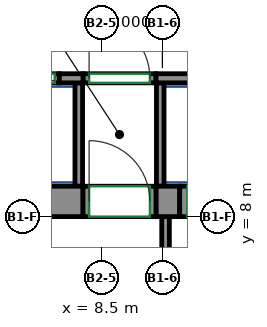
"""IFC4 building model, lengths in metres.
Left out: names, types, materials, properties, quantities, classifications, styles, units other than length and angle.
Written with IfcOpenShell. Run it as: python <this file> out.ifc"""

import sys

from ifc_helpers import new_model, si_unit, direction, frame, frame_2d, origin, place, context, subcontext, project, spatial, rectangle, extrude, source, transform, mapped, element, fill, save


model = new_model("IFC4")
c1 = context("Model", 3, precision=1e-05, world=origin(), true_north=direction((0.0, 1.0)))
c2 = subcontext(c1, "Body", "Model", "MODEL_VIEW")
j1 = project(units=[si_unit("LENGTHUNIT", "METRE"), si_unit("PLANEANGLEUNIT", "RADIAN")], contexts=[c1])
p1 = place(None, origin())
s1 = spatial("IfcSite", under=j1, at=p1, CompositionType="ELEMENT")
p2 = place(p1, origin())
s2 = spatial("IfcBuilding", under=s1, at=p2, CompositionType="ELEMENT")
p3 = place(p2, frame((0.0, 0.0, 27.0)))
s3 = spatial("IfcBuildingStorey", under=s2, at=p3, CompositionType="ELEMENT", Elevation=27.0)
m1 = source(origin(), c2, "Body", "SweptSolid", [
    extrude(rectangle(XDim=14.18, YDim=1.0, at=frame_2d((7.09, 0.0))), origin(), (0.0, 0.0, 1.0), 3.72),
])
p4 = place(p3, frame((-6.29, 8.5, 0.0), z_axis=(0.0, 0.0, 1.0), x_axis=(1.0, 0.0, 0.0)))
e1 = element("IfcWall", 1, at=p4, inside=s3, PredefinedType="SHEAR", context=c2, shape_type="MappedRepresentation", body=[
    mapped(m1, transform((0.0, 0.0, 0.0))),
])
m2 = source(origin(), c2, "Body", "SweptSolid", [
    extrude(rectangle(XDim=0.78, YDim=1.0, at=frame_2d((0.39, 0.0))), origin(), (0.0, 0.0, 1.0), 3.72),
])
p5 = place(p3, frame((10.29, 8.5, 0.0), z_axis=(0.0, 0.0, 1.0), x_axis=(1.0, 0.0, 0.0)))
e2 = element("IfcWall", 2, at=p5, inside=s3, PredefinedType="SHEAR", context=c2, shape_type="MappedRepresentation", body=[
    mapped(m2, transform((0.0, 0.0, 0.0))),
])
m3 = source(origin(), c2, "Body", "SweptSolid", [
    extrude(rectangle(XDim=0.78, YDim=0.3, at=frame_2d((0.39, 0.0))), origin(), (0.0, 0.0, 1.0), 3.72),
])
p6 = place(p3, frame((7.11, 12.55, 0.0), z_axis=(0.0, 0.0, 1.0), x_axis=(1.0, 0.0, 0.0)))
e3 = element("IfcWall", 3, at=p6, inside=s3, PredefinedType="SHEAR", context=c2, shape_type="MappedRepresentation", body=[
    mapped(m3, transform((0.0, 0.0, 0.0))),
])
m4 = source(origin(), c2, "Body", "SweptSolid", [
    extrude(rectangle(XDim=2.82, YDim=0.3, at=frame_2d((1.41, 0.0))), origin(), (0.0, 0.0, 1.0), 3.72),
])
p7 = place(p3, frame((10.29, 12.55, 0.0), z_axis=(0.0, 0.0, 1.0), x_axis=(1.0, 0.0, 0.0)))
e4 = element("IfcWall", 4, at=p7, inside=s3, PredefinedType="SHEAR", context=c2, shape_type="MappedRepresentation", body=[
    mapped(m4, transform((0.0, 0.0, 0.0))),
])
m5 = source(origin(), c2, "Body", "SweptSolid", [
    extrude(rectangle(XDim=1.4, YDim=0.3, at=frame_2d((0.7, 0.0))), origin(), (0.0, 0.0, 1.0), 3.72),
])
p8 = place(p3, frame((5.71, 12.55, 0.0), z_axis=(0.0, 0.0, 1.0), x_axis=(1.0, 0.0, 0.0)))
e5 = element("IfcWall", 5, at=p8, inside=s3, PredefinedType="PARTITIONING", context=c2, shape_type="MappedRepresentation", body=[
    mapped(m5, transform((0.0, 0.0, 0.0))),
])
p9 = place(p8, frame((0.15, 0.0, 0.0)))
e6 = element("IfcOpeningElement", 6, at=p9, cuts=e5, PredefinedType="OPENING", context=c2, shape_type="SweptSolid", body=[
    extrude(rectangle(XDim=1.1, YDim=2.1, at=frame_2d((0.55, 1.05))), frame((0.0, 0.16, 0.0), z_axis=(0.0, -1.0, 0.0), x_axis=(1.0, 0.0, 0.0)), (0.0, 0.0, 1.0), 0.32),
])
m6 = source(origin(), c2, "Body", "SweptSolid", [
    extrude(rectangle(XDim=2.4, YDim=0.3, at=frame_2d((1.2, 0.0))), origin(), (0.0, 0.0, 1.0), 3.72),
])
p10 = place(p3, frame((7.89, 12.55, 0.0), z_axis=(0.0, 0.0, 1.0), x_axis=(1.0, 0.0, 0.0)))
e7 = element("IfcWall", 7, at=p10, inside=s3, PredefinedType="PARTITIONING", context=c2, shape_type="MappedRepresentation", body=[
    mapped(m6, transform((0.0, 0.0, 0.0))),
])
p11 = place(p10, frame((0.2, 0.0, 0.0)))
e8 = element("IfcOpeningElement", 8, at=p11, cuts=e7, PredefinedType="OPENING", context=c2, shape_type="SweptSolid", body=[
    extrude(rectangle(XDim=2.0, YDim=2.1, at=frame_2d((1.0, 1.05))), frame((0.0, 0.16, 0.0), z_axis=(0.0, -1.0, 0.0), x_axis=(1.0, 0.0, 0.0)), (0.0, 0.0, 1.0), 0.32),
])
m7 = source(origin(), c2, "Body", "SweptSolid", [
    extrude(rectangle(XDim=2.65, YDim=0.25, at=frame_2d((1.325, 0.0))), origin(), (0.0, 0.0, 1.0), 3.72),
])
p12 = place(p3, frame((10.605, 5.35, 0.0), z_axis=(0.0, 0.0, 1.0), x_axis=(0.0, 1.0, 0.0)))
e9 = element("IfcWall", 9, at=p12, inside=s3, PredefinedType="PARTITIONING", context=c2, shape_type="MappedRepresentation", body=[
    mapped(m7, transform((0.0, 0.0, 0.0))),
])
m8 = source(origin(), c2, "Body", "SweptSolid", [
    extrude(rectangle(XDim=3.4, YDim=0.25, at=frame_2d((1.7, 0.0))), origin(), (0.0, 0.0, 1.0), 3.72),
])
for number, where, z_axis, x_axis in (
    (10, (10.43, 9.0, 0.0), (0.0, 0.0, 1.0), (0.0, 1.0, 0.0)),
    (11, (7.75, 9.0, 0.0), (0.0, 0.0, 1.0), (0.0, 1.0, 0.0)),
):
    element("IfcWall", number, at=place(p3, frame(where, z_axis=z_axis, x_axis=x_axis)), inside=s3, PredefinedType="PARTITIONING", context=c2, shape_type="MappedRepresentation", body=[
        mapped(m8, transform((0.0, 0.0, 0.0))),
    ])
m9 = source(origin(), c2, "Body", "SweptSolid", [
    extrude(rectangle(XDim=2.4, YDim=1.0, at=frame_2d((1.2, 0.0))), origin(), (0.0, 0.0, 1.0), 2.7),
])
p13 = place(p3, frame((7.89, 8.5, 0.0), z_axis=(0.0, 0.0, 1.0), x_axis=(1.0, 0.0, 0.0)))
e12 = element("IfcWall", 12, at=p13, inside=s3, PredefinedType="PARTITIONING", context=c2, shape_type="MappedRepresentation", body=[
    mapped(m9, transform((0.0, 0.0, 0.0))),
])
p14 = place(p13, frame((0.2, 0.0, 0.0)))
e13 = element("IfcOpeningElement", 13, at=p14, cuts=e12, PredefinedType="OPENING", context=c2, shape_type="SweptSolid", body=[
    extrude(rectangle(XDim=2.0, YDim=2.1, at=frame_2d((1.0, 1.05))), frame((0.0, 0.51, 0.0), z_axis=(0.0, -1.0, 0.0), x_axis=(1.0, 0.0, 0.0)), (0.0, 0.0, 1.0), 1.02),
])
m10 = source(origin(), c2, "Body", "SweptSolid", [
    extrude(rectangle(XDim=1.4, YDim=1.0, at=frame_2d((0.7, 0.0))), origin(), (0.0, 0.0, 1.0), 2.7),
])
p15 = place(p3, frame((11.07, 8.5, 0.0), z_axis=(0.0, 0.0, 1.0), x_axis=(1.0, 0.0, 0.0)))
e14 = element("IfcWall", 14, at=p15, inside=s3, PredefinedType="PARTITIONING", context=c2, shape_type="MappedRepresentation", body=[
    mapped(m10, transform((0.0, 0.0, 0.0))),
])
p16 = place(p15, frame((0.25, 0.0, 0.0)))
e15 = element("IfcOpeningElement", 15, at=p16, cuts=e14, PredefinedType="OPENING", context=c2, shape_type="SweptSolid", body=[
    extrude(rectangle(XDim=0.9, YDim=2.1, at=frame_2d((0.45, 1.05))), frame((0.0, 0.51, 0.0), z_axis=(0.0, -1.0, 0.0), x_axis=(1.0, 0.0, 0.0)), (0.0, 0.0, 1.0), 1.02),
])
p17 = place(p11, origin())
e16 = element("IfcDoor", 16, at=p17, inside=s3, OperationType="DOUBLE_DOOR_SINGLE_SWING", PredefinedType="DOOR", context=c2, shape_type="SweptSolid", body=[
    extrude(rectangle(XDim=2.0, YDim=2.1, at=frame_2d((1.0, 1.05))), frame((0.0, 0.025, 0.0), z_axis=(0.0, -1.0, 0.0), x_axis=(1.0, 0.0, 0.0)), (0.0, 0.0, 1.0), 0.05),
])
fill(e8, e16)
p18 = place(p14, origin())
e17 = element("IfcDoor", 17, at=p18, inside=s3, OperationType="DOUBLE_DOOR_SINGLE_SWING", PredefinedType="DOOR", context=c2, shape_type="SweptSolid", body=[
    extrude(rectangle(XDim=2.0, YDim=2.1, at=frame_2d((1.0, 1.05))), frame((0.0, 0.405, 0.0), z_axis=(0.0, -1.0, 0.0), x_axis=(1.0, 0.0, 0.0)), (0.0, 0.0, 1.0), 0.05),
])
fill(e13, e17)
p19 = place(p9, origin())
e18 = element("IfcDoor", 18, at=p19, inside=s3, OperationType="DOUBLE_DOOR_SLIDING", PredefinedType="DOOR", context=c2, shape_type="SweptSolid", body=[
    extrude(rectangle(XDim=1.1, YDim=2.1, at=frame_2d((0.55, 1.05))), frame((0.0, 0.025, 0.0), z_axis=(0.0, -1.0, 0.0), x_axis=(1.0, 0.0, 0.0)), (0.0, 0.0, 1.0), 0.05),
])
fill(e6, e18)
save(model, sys.argv[1])
